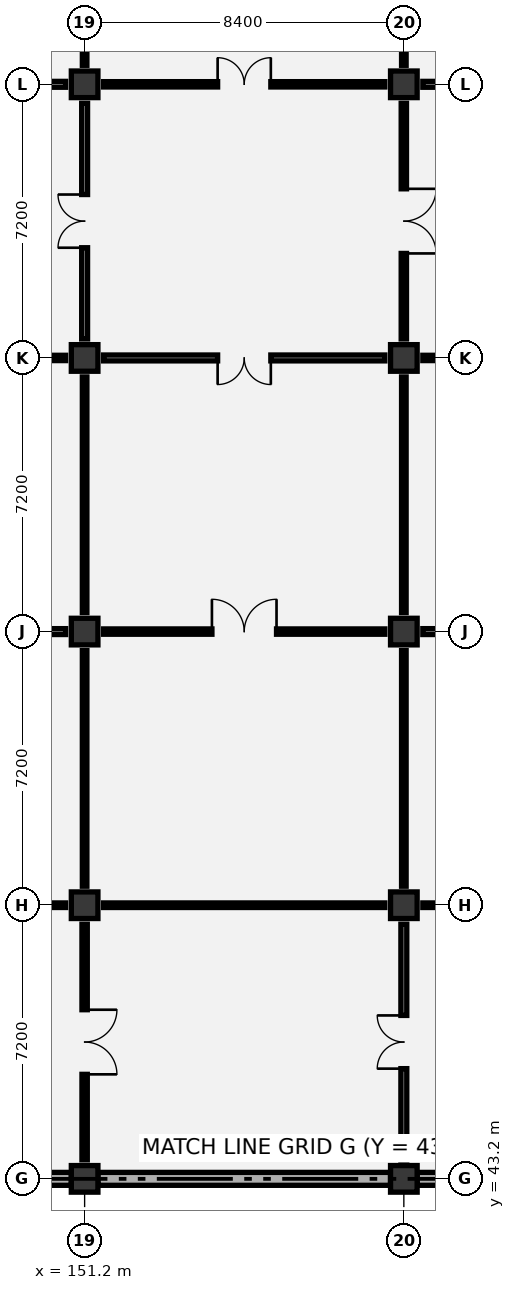
"""IFC4 building model, lengths in metres.
Left out: names, types, materials, properties, quantities, classifications, styles, units other than length and angle.
Written with IfcOpenShell. Run it as: python <this file> out.ifc"""

import sys

from ifc_helpers import new_model, si_unit, direction, frame, frame_2d, origin, origin_2d, place, context, subcontext, project, spatial, rectangle, extrude, element, fill, save


model = new_model("IFC4")
c1 = context("Model", 3, precision=1e-05, world=origin(), true_north=direction((0.0, 1.0)))
c2 = subcontext(c1, "Body", "Model", "MODEL_VIEW")
j1 = project(units=[si_unit("LENGTHUNIT", "METRE"), si_unit("PLANEANGLEUNIT", "RADIAN")], contexts=[c1])
p1 = place(None, origin())
s1 = spatial("IfcSite", under=j1, at=p1, CompositionType="ELEMENT")
p2 = place(p1, origin())
s2 = spatial("IfcBuilding", under=s1, at=p2, CompositionType="ELEMENT")
p3 = place(p2, frame((0.0, 0.0, 6.0)))
s3 = spatial("IfcBuildingStorey", under=s2, at=p3, CompositionType="ELEMENT", Elevation=6.0)
for number, where, z_axis, x_axis in (
    (1, (151.2, 43.2, 0.0), (0.0, 0.0, 1.0), (1.0, 0.0, 0.0)),
    (2, (151.2, 50.4, 0.0), (0.0, 0.0, 1.0), (1.0, 0.0, 0.0)),
    (3, (151.2, 57.6, 0.0), (0.0, 0.0, 1.0), (1.0, 0.0, 0.0)),
    (4, (151.2, 64.8, 0.0), (0.0, 0.0, 1.0), (1.0, 0.0, 0.0)),
    (5, (151.2, 72.0, 0.0), (0.0, 0.0, 1.0), (1.0, 0.0, 0.0)),
    (6, (159.6, 43.2, 0.0), (0.0, 0.0, 1.0), (1.0, 0.0, 0.0)),
    (7, (159.6, 50.4, 0.0), (0.0, 0.0, 1.0), (1.0, 0.0, 0.0)),
    (8, (159.6, 57.6, 0.0), (0.0, 0.0, 1.0), (1.0, 0.0, 0.0)),
    (9, (159.6, 64.8, 0.0), (0.0, 0.0, 1.0), (1.0, 0.0, 0.0)),
    (10, (159.6, 72.0, 0.0), (0.0, 0.0, 1.0), (1.0, 0.0, 0.0)),
):
    element("IfcColumn", number, at=place(p3, frame(where, z_axis=z_axis, x_axis=x_axis)), inside=s3, PredefinedType="COLUMN", context=c2, shape_type="SweptSolid", body=[
        extrude(rectangle(XDim=0.7, YDim=0.7, at=origin_2d()), origin(), (0.0, 0.0, 1.0), 5.4),
    ])
p4 = place(p3, frame((143.15, 43.2, 0.0), z_axis=(0.0, 0.0, 1.0), x_axis=(1.0, 0.0, 0.0)))
e11 = element("IfcWall", 11, at=p4, inside=s3, PredefinedType="SOLIDWALL", context=c2, shape_type="SweptSolid", body=[
    extrude(rectangle(XDim=7.7, YDim=0.34, at=frame_2d((3.85, 0.0))), origin(), (0.0, 0.0, 1.0), 4.42),
])
p5 = place(p3, frame((151.55, 43.2, 0.0), z_axis=(0.0, 0.0, 1.0), x_axis=(1.0, 0.0, 0.0)))
e12 = element("IfcWall", 12, at=p5, inside=s3, PredefinedType="SOLIDWALL", context=c2, shape_type="SweptSolid", body=[
    extrude(rectangle(XDim=7.7, YDim=0.34, at=frame_2d((3.85, 0.0))), origin(), (0.0, 0.0, 1.0), 4.42),
])
p6 = place(p3, frame((159.95, 43.2, 0.0), z_axis=(0.0, 0.0, 1.0), x_axis=(1.0, 0.0, 0.0)))
e13 = element("IfcWall", 13, at=p6, inside=s3, PredefinedType="SOLIDWALL", context=c2, shape_type="SweptSolid", body=[
    extrude(rectangle(XDim=7.65, YDim=0.34, at=frame_2d((3.825, 0.0))), origin(), (0.0, 0.0, 1.0), 4.52),
])
p7 = place(p3, frame((151.2, 43.7, 0.0), z_axis=(0.0, 0.0, 1.0), x_axis=(0.0, 1.0, 0.0)))
e14 = element("IfcWall", 14, at=p7, inside=s3, PredefinedType="PARTITIONING", context=c2, shape_type="SweptSolid", body=[
    extrude(rectangle(XDim=6.2, YDim=0.14, at=frame_2d((3.1, 0.0))), origin(), (0.0, 0.0, 1.0), 4.32),
])
p8 = place(p7, frame((2.25, 0.0, 0.0)))
e15 = element("IfcOpeningElement", 15, at=p8, cuts=e14, PredefinedType="OPENING", context=c2, shape_type="SweptSolid", body=[
    extrude(rectangle(XDim=1.7, YDim=2.25, at=frame_2d((0.85, 1.125))), frame((0.0, 0.08, 0.0), z_axis=(0.0, -1.0, 0.0), x_axis=(1.0, 0.0, 0.0)), (0.0, 0.0, 1.0), 0.16),
])
p9 = place(p3, frame((143.3, 50.4, 0.0), z_axis=(0.0, 0.0, 1.0), x_axis=(1.0, 0.0, 0.0)))
e16 = element("IfcWall", 16, at=p9, inside=s3, PredefinedType="PARTITIONING", context=c2, shape_type="SweptSolid", body=[
    extrude(rectangle(XDim=7.4, YDim=0.12, at=frame_2d((3.7, 0.0))), origin(), (0.0, 0.0, 1.0), 4.27),
])
p10 = place(p3, frame((151.2, 50.9, 0.0), z_axis=(0.0, 0.0, 1.0), x_axis=(0.0, 1.0, 0.0)))
e17 = element("IfcWall", 17, at=p10, inside=s3, PredefinedType="PARTITIONING", context=c2, shape_type="SweptSolid", body=[
    extrude(rectangle(XDim=6.2, YDim=0.12, at=frame_2d((3.1, 0.0))), origin(), (0.0, 0.0, 1.0), 4.78),
])
p11 = place(p3, frame((143.3, 57.6, 0.0), z_axis=(0.0, 0.0, 1.0), x_axis=(1.0, 0.0, 0.0)))
e18 = element("IfcWall", 18, at=p11, inside=s3, PredefinedType="PARTITIONING", context=c2, shape_type="SweptSolid", body=[
    extrude(rectangle(XDim=7.4, YDim=0.155, at=frame_2d((3.7, 0.0))), origin(), (0.0, 0.0, 1.0), 4.27),
])
p12 = place(p11, frame((3.0, 0.0, 0.0)))
e19 = element("IfcOpeningElement", 19, at=p12, cuts=e18, PredefinedType="OPENING", context=c2, shape_type="SweptSolid", body=[
    extrude(rectangle(XDim=1.4, YDim=2.15, at=frame_2d((0.7, 1.075))), frame((0.0, 0.087, 0.0), z_axis=(0.0, -1.0, 0.0), x_axis=(1.0, 0.0, 0.0)), (0.0, 0.0, 1.0), 0.175),
])
p13 = place(p3, frame((151.2, 58.1, 0.0), z_axis=(0.0, 0.0, 1.0), x_axis=(0.0, 1.0, 0.0)))
e20 = element("IfcWall", 20, at=p13, inside=s3, PredefinedType="PARTITIONING", context=c2, shape_type="SweptSolid", body=[
    extrude(rectangle(XDim=6.2, YDim=0.12, at=frame_2d((3.1, 0.0))), origin(), (0.0, 0.0, 1.0), 4.32),
])
p14 = place(p3, frame((143.3, 64.8, 0.0), z_axis=(0.0, 0.0, 1.0), x_axis=(1.0, 0.0, 0.0)))
e21 = element("IfcWall", 21, at=p14, inside=s3, PredefinedType="PARTITIONING", context=c2, shape_type="SweptSolid", body=[
    extrude(rectangle(XDim=7.4, YDim=0.14, at=frame_2d((3.7, 0.0))), origin(), (0.0, 0.0, 1.0), 4.27),
])
p15 = place(p14, frame((2.85, 0.0, 0.0)))
e22 = element("IfcOpeningElement", 22, at=p15, cuts=e21, PredefinedType="OPENING", context=c2, shape_type="SweptSolid", body=[
    extrude(rectangle(XDim=1.7, YDim=2.25, at=frame_2d((0.85, 1.125))), frame((0.0, 0.08, 0.0), z_axis=(0.0, -1.0, 0.0), x_axis=(1.0, 0.0, 0.0)), (0.0, 0.0, 1.0), 0.16),
])
p16 = place(p3, frame((151.2, 65.3, 0.0), z_axis=(0.0, 0.0, 1.0), x_axis=(0.0, 1.0, 0.0)))
e23 = element("IfcWall", 23, at=p16, inside=s3, PredefinedType="PARTITIONING", context=c2, shape_type="SweptSolid", body=[
    extrude(rectangle(XDim=6.2, YDim=0.155, at=frame_2d((3.1, 0.0))), origin(), (0.0, 0.0, 1.0), 4.57),
])
p17 = place(p16, frame((2.4, 0.0, 0.0)))
e24 = element("IfcOpeningElement", 24, at=p17, cuts=e23, PredefinedType="OPENING", context=c2, shape_type="SweptSolid", body=[
    extrude(rectangle(XDim=1.4, YDim=2.15, at=frame_2d((0.7, 1.075))), frame((0.0, 0.087, 0.0), z_axis=(0.0, -1.0, 0.0), x_axis=(1.0, 0.0, 0.0)), (0.0, 0.0, 1.0), 0.175),
])
p18 = place(p3, frame((143.3, 72.0, 0.0), z_axis=(0.0, 0.0, 1.0), x_axis=(1.0, 0.0, 0.0)))
e25 = element("IfcWall", 25, at=p18, inside=s3, PredefinedType="PARTITIONING", context=c2, shape_type="SweptSolid", body=[
    extrude(rectangle(XDim=7.4, YDim=0.155, at=frame_2d((3.7, 0.0))), origin(), (0.0, 0.0, 1.0), 4.27),
])
p19 = place(p18, frame((2.85, 0.0, 0.0)))
e26 = element("IfcOpeningElement", 26, at=p19, cuts=e25, PredefinedType="OPENING", context=c2, shape_type="SweptSolid", body=[
    extrude(rectangle(XDim=1.7, YDim=2.25, at=frame_2d((0.85, 1.125))), frame((0.0, 0.087, 0.0), z_axis=(0.0, -1.0, 0.0), x_axis=(1.0, 0.0, 0.0)), (0.0, 0.0, 1.0), 0.175),
])
p20 = place(p3, frame((151.2, 72.5, 0.0), z_axis=(0.0, 0.0, 1.0), x_axis=(0.0, 1.0, 0.0)))
e27 = element("IfcWall", 27, at=p20, inside=s3, PredefinedType="PARTITIONING", context=c2, shape_type="SweptSolid", body=[
    extrude(rectangle(XDim=6.2, YDim=0.12, at=frame_2d((3.1, 0.0))), origin(), (0.0, 0.0, 1.0), 4.32),
])
p21 = place(p3, frame((159.6, 43.7, 0.0), z_axis=(0.0, 0.0, 1.0), x_axis=(0.0, 1.0, 0.0)))
e28 = element("IfcWall", 28, at=p21, inside=s3, PredefinedType="PARTITIONING", context=c2, shape_type="SweptSolid", body=[
    extrude(rectangle(XDim=6.2, YDim=0.155, at=frame_2d((3.1, 0.0))), origin(), (0.0, 0.0, 1.0), 4.78),
])
p22 = place(p21, frame((2.4, 0.0, 0.0)))
e29 = element("IfcOpeningElement", 29, at=p22, cuts=e28, PredefinedType="OPENING", context=c2, shape_type="SweptSolid", body=[
    extrude(rectangle(XDim=1.4, YDim=2.15, at=frame_2d((0.7, 1.075))), frame((0.0, 0.087, 0.0), z_axis=(0.0, -1.0, 0.0), x_axis=(1.0, 0.0, 0.0)), (0.0, 0.0, 1.0), 0.175),
])
p23 = place(p3, frame((151.7, 50.4, 0.0), z_axis=(0.0, 0.0, 1.0), x_axis=(1.0, 0.0, 0.0)))
e30 = element("IfcWall", 30, at=p23, inside=s3, PredefinedType="PARTITIONING", context=c2, shape_type="SweptSolid", body=[
    extrude(rectangle(XDim=7.4, YDim=0.12, at=frame_2d((3.7, 0.0))), origin(), (0.0, 0.0, 1.0), 4.27),
])
p24 = place(p3, frame((159.6, 50.9, 0.0), z_axis=(0.0, 0.0, 1.0), x_axis=(0.0, 1.0, 0.0)))
e31 = element("IfcWall", 31, at=p24, inside=s3, PredefinedType="PARTITIONING", context=c2, shape_type="SweptSolid", body=[
    extrude(rectangle(XDim=6.2, YDim=0.12, at=frame_2d((3.1, 0.0))), origin(), (0.0, 0.0, 1.0), 4.32),
])
p25 = place(p3, frame((151.7, 57.6, 0.0), z_axis=(0.0, 0.0, 1.0), x_axis=(1.0, 0.0, 0.0)))
e32 = element("IfcWall", 32, at=p25, inside=s3, PredefinedType="PARTITIONING", context=c2, shape_type="SweptSolid", body=[
    extrude(rectangle(XDim=7.4, YDim=0.14, at=frame_2d((3.7, 0.0))), origin(), (0.0, 0.0, 1.0), 4.27),
])
p26 = place(p25, frame((2.85, 0.0, 0.0)))
e33 = element("IfcOpeningElement", 33, at=p26, cuts=e32, PredefinedType="OPENING", context=c2, shape_type="SweptSolid", body=[
    extrude(rectangle(XDim=1.7, YDim=2.25, at=frame_2d((0.85, 1.125))), frame((0.0, 0.08, 0.0), z_axis=(0.0, -1.0, 0.0), x_axis=(1.0, 0.0, 0.0)), (0.0, 0.0, 1.0), 0.16),
])
p27 = place(p3, frame((159.6, 58.1, 0.0), z_axis=(0.0, 0.0, 1.0), x_axis=(0.0, 1.0, 0.0)))
e34 = element("IfcWall", 34, at=p27, inside=s3, PredefinedType="PARTITIONING", context=c2, shape_type="SweptSolid", body=[
    extrude(rectangle(XDim=6.2, YDim=0.12, at=frame_2d((3.1, 0.0))), origin(), (0.0, 0.0, 1.0), 4.57),
])
p28 = place(p3, frame((151.7, 64.8, 0.0), z_axis=(0.0, 0.0, 1.0), x_axis=(1.0, 0.0, 0.0)))
e35 = element("IfcWall", 35, at=p28, inside=s3, PredefinedType="PARTITIONING", context=c2, shape_type="SweptSolid", body=[
    extrude(rectangle(XDim=7.4, YDim=0.155, at=frame_2d((3.7, 0.0))), origin(), (0.0, 0.0, 1.0), 4.27),
])
p29 = place(p28, frame((3.0, 0.0, 0.0)))
e36 = element("IfcOpeningElement", 36, at=p29, cuts=e35, PredefinedType="OPENING", context=c2, shape_type="SweptSolid", body=[
    extrude(rectangle(XDim=1.4, YDim=2.15, at=frame_2d((0.7, 1.075))), frame((0.0, 0.087, 0.0), z_axis=(0.0, -1.0, 0.0), x_axis=(1.0, 0.0, 0.0)), (0.0, 0.0, 1.0), 0.175),
])
p30 = place(p3, frame((159.6, 65.3, 0.0), z_axis=(0.0, 0.0, 1.0), x_axis=(0.0, 1.0, 0.0)))
e37 = element("IfcWall", 37, at=p30, inside=s3, PredefinedType="PARTITIONING", context=c2, shape_type="SweptSolid", body=[
    extrude(rectangle(XDim=6.2, YDim=0.14, at=frame_2d((3.1, 0.0))), origin(), (0.0, 0.0, 1.0), 4.32),
])
p31 = place(p30, frame((2.25, 0.0, 0.0)))
e38 = element("IfcOpeningElement", 38, at=p31, cuts=e37, PredefinedType="OPENING", context=c2, shape_type="SweptSolid", body=[
    extrude(rectangle(XDim=1.7, YDim=2.25, at=frame_2d((0.85, 1.125))), frame((0.0, 0.08, 0.0), z_axis=(0.0, -1.0, 0.0), x_axis=(1.0, 0.0, 0.0)), (0.0, 0.0, 1.0), 0.16),
])
p32 = place(p3, frame((151.7, 72.0, 0.0), z_axis=(0.0, 0.0, 1.0), x_axis=(1.0, 0.0, 0.0)))
e39 = element("IfcWall", 39, at=p32, inside=s3, PredefinedType="PARTITIONING", context=c2, shape_type="SweptSolid", body=[
    extrude(rectangle(XDim=7.4, YDim=0.14, at=frame_2d((3.7, 0.0))), origin(), (0.0, 0.0, 1.0), 4.27),
])
p33 = place(p32, frame((3.0, 0.0, 0.0)))
e40 = element("IfcOpeningElement", 40, at=p33, cuts=e39, PredefinedType="OPENING", context=c2, shape_type="SweptSolid", body=[
    extrude(rectangle(XDim=1.4, YDim=2.15, at=frame_2d((0.7, 1.075))), frame((0.0, 0.08, 0.0), z_axis=(0.0, -1.0, 0.0), x_axis=(1.0, 0.0, 0.0)), (0.0, 0.0, 1.0), 0.16),
])
p34 = place(p3, frame((159.6, 72.5, 0.0), z_axis=(0.0, 0.0, 1.0), x_axis=(0.0, 1.0, 0.0)))
e41 = element("IfcWall", 41, at=p34, inside=s3, PredefinedType="PARTITIONING", context=c2, shape_type="SweptSolid", body=[
    extrude(rectangle(XDim=6.2, YDim=0.12, at=frame_2d((3.1, 0.0))), origin(), (0.0, 0.0, 1.0), 4.67),
])
p35 = place(p3, frame((160.1, 50.4, 0.0), z_axis=(0.0, 0.0, 1.0), x_axis=(1.0, 0.0, 0.0)))
e42 = element("IfcWall", 42, at=p35, inside=s3, PredefinedType="PARTITIONING", context=c2, shape_type="SweptSolid", body=[
    extrude(rectangle(XDim=7.4, YDim=0.12, at=frame_2d((3.7, 0.0))), origin(), (0.0, 0.0, 1.0), 4.37),
])
p36 = place(p3, frame((160.1, 57.6, 0.0), z_axis=(0.0, 0.0, 1.0), x_axis=(1.0, 0.0, 0.0)))
e43 = element("IfcWall", 43, at=p36, inside=s3, PredefinedType="PARTITIONING", context=c2, shape_type="SweptSolid", body=[
    extrude(rectangle(XDim=7.4, YDim=0.155, at=frame_2d((3.7, 0.0))), origin(), (0.0, 0.0, 1.0), 4.37),
])
p37 = place(p36, frame((2.85, 0.0, 0.0)))
e44 = element("IfcOpeningElement", 44, at=p37, cuts=e43, PredefinedType="OPENING", context=c2, shape_type="SweptSolid", body=[
    extrude(rectangle(XDim=1.7, YDim=2.25, at=frame_2d((0.85, 1.125))), frame((0.0, 0.087, 0.0), z_axis=(0.0, -1.0, 0.0), x_axis=(1.0, 0.0, 0.0)), (0.0, 0.0, 1.0), 0.175),
])
p38 = place(p3, frame((160.1, 64.8, 0.0), z_axis=(0.0, 0.0, 1.0), x_axis=(1.0, 0.0, 0.0)))
e45 = element("IfcWall", 45, at=p38, inside=s3, PredefinedType="PARTITIONING", context=c2, shape_type="SweptSolid", body=[
    extrude(rectangle(XDim=7.4, YDim=0.14, at=frame_2d((3.7, 0.0))), origin(), (0.0, 0.0, 1.0), 4.37),
])
p39 = place(p38, frame((3.0, 0.0, 0.0)))
e46 = element("IfcOpeningElement", 46, at=p39, cuts=e45, PredefinedType="OPENING", context=c2, shape_type="SweptSolid", body=[
    extrude(rectangle(XDim=1.4, YDim=2.15, at=frame_2d((0.7, 1.075))), frame((0.0, 0.08, 0.0), z_axis=(0.0, -1.0, 0.0), x_axis=(1.0, 0.0, 0.0)), (0.0, 0.0, 1.0), 0.16),
])
p40 = place(p3, frame((160.1, 72.0, 0.0), z_axis=(0.0, 0.0, 1.0), x_axis=(1.0, 0.0, 0.0)))
e47 = element("IfcWall", 47, at=p40, inside=s3, PredefinedType="PARTITIONING", context=c2, shape_type="SweptSolid", body=[
    extrude(rectangle(XDim=7.4, YDim=0.155, at=frame_2d((3.7, 0.0))), origin(), (0.0, 0.0, 1.0), 4.37),
])
p41 = place(p40, frame((2.85, 0.0, 0.0)))
e48 = element("IfcOpeningElement", 48, at=p41, cuts=e47, PredefinedType="OPENING", context=c2, shape_type="SweptSolid", body=[
    extrude(rectangle(XDim=1.7, YDim=2.25, at=frame_2d((0.85, 1.125))), frame((0.0, 0.087, 0.0), z_axis=(0.0, -1.0, 0.0), x_axis=(1.0, 0.0, 0.0)), (0.0, 0.0, 1.0), 0.175),
])
p42 = place(p8, frame((1.7, 0.0, 0.0), z_axis=(0.0, 0.0, 1.0), x_axis=(-1.0, 0.0, 0.0)))
e49 = element("IfcDoor", 49, at=p42, inside=s3, OperationType="DOUBLE_DOOR_SINGLE_SWING", PredefinedType="DOOR", context=c2, shape_type="SweptSolid", body=[
    extrude(rectangle(XDim=1.7, YDim=2.25, at=frame_2d((0.85, 1.125))), frame((0.0, 0.025, 0.0), z_axis=(0.0, -1.0, 0.0), x_axis=(1.0, 0.0, 0.0)), (0.0, 0.0, 1.0), 0.05),
])
fill(e15, e49)
p43 = place(p17, origin())
e50 = element("IfcDoor", 50, at=p43, inside=s3, OperationType="DOUBLE_DOOR_SINGLE_SWING", PredefinedType="DOOR", context=c2, shape_type="SweptSolid", body=[
    extrude(rectangle(XDim=1.4, YDim=2.15, at=frame_2d((0.7, 1.075))), frame((0.0, 0.025, 0.0), z_axis=(0.0, -1.0, 0.0), x_axis=(1.0, 0.0, 0.0)), (0.0, 0.0, 1.0), 0.05),
])
fill(e24, e50)
p44 = place(p22, origin())
e51 = element("IfcDoor", 51, at=p44, inside=s3, OperationType="DOUBLE_DOOR_SINGLE_SWING", PredefinedType="DOOR", context=c2, shape_type="SweptSolid", body=[
    extrude(rectangle(XDim=1.4, YDim=2.15, at=frame_2d((0.7, 1.075))), frame((0.0, 0.025, 0.0), z_axis=(0.0, -1.0, 0.0), x_axis=(1.0, 0.0, 0.0)), (0.0, 0.0, 1.0), 0.05),
])
fill(e29, e51)
p45 = place(p26, origin())
e52 = element("IfcDoor", 52, at=p45, inside=s3, OperationType="DOUBLE_DOOR_SINGLE_SWING", PredefinedType="DOOR", context=c2, shape_type="SweptSolid", body=[
    extrude(rectangle(XDim=1.7, YDim=2.25, at=frame_2d((0.85, 1.125))), frame((0.0, 0.025, 0.0), z_axis=(0.0, -1.0, 0.0), x_axis=(1.0, 0.0, 0.0)), (0.0, 0.0, 1.0), 0.05),
])
fill(e33, e52)
p46 = place(p29, frame((1.4, 0.0, 0.0), z_axis=(0.0, 0.0, 1.0), x_axis=(-1.0, 0.0, 0.0)))
e53 = element("IfcDoor", 53, at=p46, inside=s3, OperationType="DOUBLE_DOOR_SINGLE_SWING", PredefinedType="DOOR", context=c2, shape_type="SweptSolid", body=[
    extrude(rectangle(XDim=1.4, YDim=2.15, at=frame_2d((0.7, 1.075))), frame((0.0, 0.025, 0.0), z_axis=(0.0, -1.0, 0.0), x_axis=(1.0, 0.0, 0.0)), (0.0, 0.0, 1.0), 0.05),
])
fill(e36, e53)
p47 = place(p31, frame((1.7, 0.0, 0.0), z_axis=(0.0, 0.0, 1.0), x_axis=(-1.0, 0.0, 0.0)))
e54 = element("IfcDoor", 54, at=p47, inside=s3, OperationType="DOUBLE_DOOR_SINGLE_SWING", PredefinedType="DOOR", context=c2, shape_type="SweptSolid", body=[
    extrude(rectangle(XDim=1.7, YDim=2.25, at=frame_2d((0.85, 1.125))), frame((0.0, 0.025, 0.0), z_axis=(0.0, -1.0, 0.0), x_axis=(1.0, 0.0, 0.0)), (0.0, 0.0, 1.0), 0.05),
])
fill(e38, e54)
p48 = place(p33, origin())
e55 = element("IfcDoor", 55, at=p48, inside=s3, OperationType="DOUBLE_DOOR_SINGLE_SWING", PredefinedType="DOOR", context=c2, shape_type="SweptSolid", body=[
    extrude(rectangle(XDim=1.4, YDim=2.15, at=frame_2d((0.7, 1.075))), frame((0.0, 0.025, 0.0), z_axis=(0.0, -1.0, 0.0), x_axis=(1.0, 0.0, 0.0)), (0.0, 0.0, 1.0), 0.05),
])
fill(e40, e55)
save(model, sys.argv[1])
